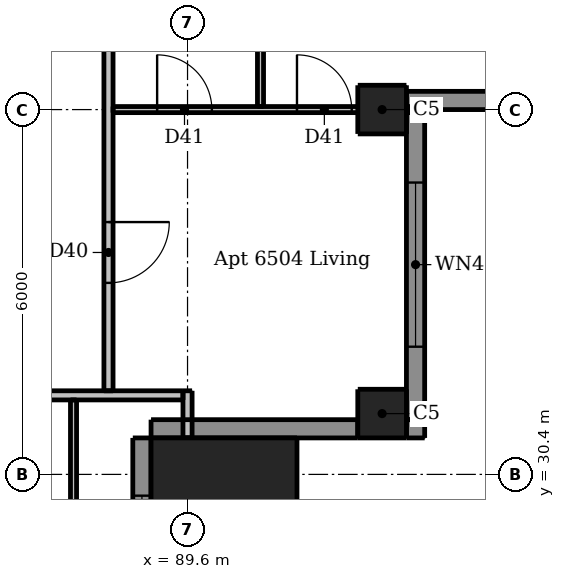
"""IFC4 building model, lengths in metres.
Left out: names, types, materials, properties, quantities, classifications, styles, units other than length and angle.
Written with IfcOpenShell. Run it as: python <this file> out.ifc"""

import sys

from ifc_helpers import new_model, si_unit, direction, frame, frame_2d, origin, origin_2d, place, context, subcontext, project, spatial, rectangle, extrude, element, fill, save


model = new_model("IFC4")
c1 = context("Model", 3, precision=1e-05, world=origin(), true_north=direction((0.0, 1.0)))
c2 = subcontext(c1, "Body", "Model", "MODEL_VIEW")
j1 = project(units=[si_unit("LENGTHUNIT", "METRE"), si_unit("PLANEANGLEUNIT", "RADIAN")], contexts=[c1])
p1 = place(None, origin())
s1 = spatial("IfcSite", under=j1, at=p1, CompositionType="ELEMENT")
p2 = place(p1, origin())
s2 = spatial("IfcBuilding", under=s1, at=p2, CompositionType="ELEMENT")
p3 = place(p2, frame((0.0, 0.0, 245.5)))
s3 = spatial("IfcBuildingStorey", under=s2, at=p3, CompositionType="ELEMENT", Elevation=245.5)
for number, where, z_axis, x_axis in (
    (1, (92.8, 31.4, 0.0), (0.0, 0.0, 1.0), (1.0, 0.0, 0.0)),
    (2, (92.8, 36.4, 0.0), (0.0, 0.0, 1.0), (1.0, 0.0, 0.0)),
):
    element("IfcColumn", number, at=place(p3, frame(where, z_axis=z_axis, x_axis=x_axis)), inside=s3, PredefinedType="COLUMN", context=c2, shape_type="SweptSolid", body=[
        extrude(rectangle(XDim=0.8, YDim=0.8, at=origin_2d()), origin(), (0.0, 0.0, 1.0), 3.05),
    ])
p4 = place(p3, frame((90.2, 29.8, 0.0), z_axis=(0.0, 0.0, 1.0), x_axis=(1.0, 0.0, 0.0)))
e3 = element("IfcColumn", 3, at=p4, inside=s3, PredefinedType="COLUMN", context=c2, shape_type="SweptSolid", body=[
    extrude(rectangle(XDim=2.4, YDim=2.4, at=origin_2d()), origin(), (0.0, 0.0, 1.0), 3.3),
])
p5 = place(p3, frame((88.85, 27.6, 0.0), z_axis=(0.0, 0.0, 1.0), x_axis=(0.0, 1.0, 0.0)))
e4 = element("IfcWall", 4, at=p5, inside=s3, PredefinedType="SOLIDWALL", context=c2, shape_type="SweptSolid", body=[
    extrude(rectangle(XDim=3.4, YDim=0.3, at=frame_2d((1.7, 0.0))), origin(), (0.0, 0.0, 1.0), 3.05),
])
p6 = place(p5, frame((0.95, 0.0, 0.9)))
e5 = element("IfcOpeningElement", 5, at=p6, cuts=e4, PredefinedType="OPENING", context=c2, shape_type="SweptSolid", body=[
    extrude(rectangle(XDim=1.5, YDim=1.5, at=frame_2d((0.75, 0.75))), frame((0.0, 0.16, 0.0), z_axis=(0.0, -1.0, 0.0), x_axis=(1.0, 0.0, 0.0)), (0.0, 0.0, 1.0), 0.32),
])
p7 = place(p3, frame((89.0, 31.15, 0.0), z_axis=(0.0, 0.0, 1.0), x_axis=(1.0, 0.0, 0.0)))
e6 = element("IfcWall", 6, at=p7, inside=s3, PredefinedType="SOLIDWALL", context=c2, shape_type="SweptSolid", body=[
    extrude(rectangle(XDim=3.4, YDim=0.3, at=frame_2d((1.7, 0.0))), origin(), (0.0, 0.0, 1.0), 3.05),
])
p8 = place(p3, frame((93.2, 31.15, 0.0), z_axis=(0.0, 0.0, 1.0), x_axis=(1.0, 0.0, 0.0)))
e7 = element("IfcWall", 7, at=p8, inside=s3, PredefinedType="SOLIDWALL", context=c2, shape_type="SweptSolid", body=[
    extrude(rectangle(XDim=0.3, YDim=0.3, at=frame_2d((0.15, 0.0))), origin(), (0.0, 0.0, 1.0), 3.05),
])
p9 = place(p3, frame((93.2, 36.55, 0.0), z_axis=(0.0, 0.0, 1.0), x_axis=(1.0, 0.0, 0.0)))
e8 = element("IfcWall", 8, at=p9, inside=s3, PredefinedType="SOLIDWALL", context=c2, shape_type="SweptSolid", body=[
    extrude(rectangle(XDim=1.8, YDim=0.3, at=frame_2d((0.9, 0.0))), origin(), (0.0, 0.0, 1.0), 3.05),
])
p10 = place(p3, frame((93.35, 31.3, 0.0), z_axis=(0.0, 0.0, 1.0), x_axis=(0.0, 1.0, 0.0)))
e9 = element("IfcWall", 9, at=p10, inside=s3, PredefinedType="SOLIDWALL", context=c2, shape_type="SweptSolid", body=[
    extrude(rectangle(XDim=5.1, YDim=0.3, at=frame_2d((2.55, 0.0))), origin(), (0.0, 0.0, 1.0), 3.05),
])
p11 = place(p10, frame((1.2, 0.0, 0.15)))
e10 = element("IfcOpeningElement", 10, at=p11, cuts=e9, PredefinedType="OPENING", context=c2, shape_type="SweptSolid", body=[
    extrude(rectangle(XDim=2.7, YDim=2.1, at=frame_2d((1.35, 1.05))), frame((0.0, 0.16, 0.0), z_axis=(0.0, -1.0, 0.0), x_axis=(1.0, 0.0, 0.0)), (0.0, 0.0, 1.0), 0.32),
])
p12 = place(p3, frame((87.725, 29.05, 0.0), z_axis=(0.0, 0.0, 1.0), x_axis=(0.0, 1.0, 0.0)))
e11 = element("IfcWall", 11, at=p12, inside=s3, PredefinedType="PARTITIONING", context=c2, shape_type="SweptSolid", body=[
    extrude(rectangle(XDim=2.575, YDim=0.1, at=frame_2d((1.288, 0.0))), origin(), (0.0, 0.0, 1.0), 3.05),
])
p13 = place(p3, frame((90.8, 36.45, 0.0), z_axis=(0.0, 0.0, 1.0), x_axis=(0.0, 1.0, 0.0)))
e12 = element("IfcWall", 12, at=p13, inside=s3, PredefinedType="PARTITIONING", context=c2, shape_type="SweptSolid", body=[
    extrude(rectangle(XDim=5.875, YDim=0.1, at=frame_2d((2.938, 0.0))), origin(), (0.0, 0.0, 1.0), 3.05),
])
p14 = place(p13, frame((3.75, 0.0, 0.0)))
e13 = element("IfcOpeningElement", 13, at=p14, cuts=e12, PredefinedType="OPENING", context=c2, shape_type="SweptSolid", body=[
    extrude(rectangle(XDim=0.8, YDim=2.1, at=frame_2d((0.4, 1.05))), frame((0.0, 0.06, 0.0), z_axis=(0.0, -1.0, 0.0), x_axis=(1.0, 0.0, 0.0)), (0.0, 0.0, 1.0), 0.12),
])
p15 = place(p3, frame((88.375, 36.4, 0.0), z_axis=(0.0, 0.0, 1.0), x_axis=(1.0, 0.0, 0.0)))
e14 = element("IfcWall", 14, at=p15, inside=s3, PredefinedType="PARTITIONING", context=c2, shape_type="SweptSolid", body=[
    extrude(rectangle(XDim=5.125, YDim=0.1, at=frame_2d((2.562, 0.0))), origin(), (0.0, 0.0, 1.0), 2.647),
])
p16 = place(p15, frame((0.725, 0.0, 0.0)))
e15 = element("IfcOpeningElement", 15, at=p16, cuts=e14, PredefinedType="OPENING", context=c2, shape_type="SweptSolid", body=[
    extrude(rectangle(XDim=0.9, YDim=2.1, at=frame_2d((0.45, 1.05))), frame((0.0, 0.06, 0.0), z_axis=(0.0, -1.0, 0.0), x_axis=(1.0, 0.0, 0.0)), (0.0, 0.0, 1.0), 0.12),
])
p17 = place(p15, frame((3.025, 0.0, 0.0)))
e16 = element("IfcOpeningElement", 16, at=p17, cuts=e14, PredefinedType="OPENING", context=c2, shape_type="SweptSolid", body=[
    extrude(rectangle(XDim=0.9, YDim=2.1, at=frame_2d((0.45, 1.05))), frame((0.0, 0.06, 0.0), z_axis=(0.0, -1.0, 0.0), x_axis=(1.0, 0.0, 0.0)), (0.0, 0.0, 1.0), 0.12),
])
p18 = place(p3, frame((88.3, 61.175, 0.0), z_axis=(0.0, 0.0, 1.0), x_axis=(0.0, -1.0, 0.0)))
e17 = element("IfcWall", 17, at=p18, inside=s3, PredefinedType="PARTITIONING", context=c2, shape_type="SweptSolid", body=[
    extrude(rectangle(XDim=29.4, YDim=0.15, at=frame_2d((14.7, 0.0))), origin(), (0.0, 0.0, 1.0), 3.05),
])
p19 = place(p18, frame((26.625, 0.0, 0.0)))
e18 = element("IfcOpeningElement", 18, at=p19, cuts=e17, PredefinedType="OPENING", context=c2, shape_type="SweptSolid", body=[
    extrude(rectangle(XDim=1.0, YDim=2.1, at=frame_2d((0.5, 1.05))), frame((0.0, 0.085, 0.0), z_axis=(0.0, -1.0, 0.0), x_axis=(1.0, 0.0, 0.0)), (0.0, 0.0, 1.0), 0.17),
])
p20 = place(p18, frame((15.275, 0.0, 0.0)))
e19 = element("IfcOpeningElement", 19, at=p20, cuts=e17, PredefinedType="OPENING", context=c2, shape_type="SweptSolid", body=[
    extrude(rectangle(XDim=1.0, YDim=2.1, at=frame_2d((0.5, 1.05))), frame((0.0, 0.085, 0.0), z_axis=(0.0, -1.0, 0.0), x_axis=(1.0, 0.0, 0.0)), (0.0, 0.0, 1.0), 0.17),
])
p21 = place(p18, frame((9.275, 0.0, 0.0)))
e20 = element("IfcOpeningElement", 20, at=p21, cuts=e17, PredefinedType="OPENING", context=c2, shape_type="SweptSolid", body=[
    extrude(rectangle(XDim=1.0, YDim=2.1, at=frame_2d((0.5, 1.05))), frame((0.0, 0.085, 0.0), z_axis=(0.0, -1.0, 0.0), x_axis=(1.0, 0.0, 0.0)), (0.0, 0.0, 1.0), 0.17),
])
p22 = place(p18, frame((3.275, 0.0, 0.0)))
e21 = element("IfcOpeningElement", 21, at=p22, cuts=e17, PredefinedType="OPENING", context=c2, shape_type="SweptSolid", body=[
    extrude(rectangle(XDim=1.0, YDim=2.1, at=frame_2d((0.5, 1.05))), frame((0.0, 0.085, 0.0), z_axis=(0.0, -1.0, 0.0), x_axis=(1.0, 0.0, 0.0)), (0.0, 0.0, 1.0), 0.17),
])
p23 = place(p3, frame((89.6, 31.0, 0.0), z_axis=(0.0, 0.0, 1.0), x_axis=(0.0, 1.0, 0.0)))
e22 = element("IfcWall", 22, at=p23, inside=s3, PredefinedType="PARTITIONING", context=c2, shape_type="SweptSolid", body=[
    extrude(rectangle(XDim=0.775, YDim=0.15, at=frame_2d((0.387, 0.0))), origin(), (0.0, 0.0, 1.0), 3.05),
])
p24 = place(p3, frame((89.525, 31.7, 0.0), z_axis=(0.0, 0.0, 1.0), x_axis=(-1.0, 0.0, 0.0)))
e23 = element("IfcWall", 23, at=p24, inside=s3, PredefinedType="PARTITIONING", context=c2, shape_type="SweptSolid", body=[
    extrude(rectangle(XDim=30.55, YDim=0.15, at=frame_2d((15.275, 0.0))), origin(), (0.0, 0.0, 1.0), 3.05),
])
p25 = place(p24, frame((26.775, 0.0, 0.0)))
e24 = element("IfcOpeningElement", 24, at=p25, cuts=e23, PredefinedType="OPENING", context=c2, shape_type="SweptSolid", body=[
    extrude(rectangle(XDim=1.0, YDim=2.1, at=frame_2d((0.5, 1.05))), frame((0.0, 0.085, 0.0), z_axis=(0.0, -1.0, 0.0), x_axis=(1.0, 0.0, 0.0)), (0.0, 0.0, 1.0), 0.17),
])
p26 = place(p24, frame((14.425, 0.0, 0.0)))
e25 = element("IfcOpeningElement", 25, at=p26, cuts=e23, PredefinedType="OPENING", context=c2, shape_type="SweptSolid", body=[
    extrude(rectangle(XDim=1.0, YDim=2.1, at=frame_2d((0.5, 1.05))), frame((0.0, 0.085, 0.0), z_axis=(0.0, -1.0, 0.0), x_axis=(1.0, 0.0, 0.0)), (0.0, 0.0, 1.0), 0.17),
])
p27 = place(p24, frame((6.962, 0.0, 0.0)))
e26 = element("IfcOpeningElement", 26, at=p27, cuts=e23, PredefinedType="OPENING", context=c2, shape_type="SweptSolid", body=[
    extrude(rectangle(XDim=1.0, YDim=2.1, at=frame_2d((0.5, 1.05))), frame((0.0, 0.085, 0.0), z_axis=(0.0, -1.0, 0.0), x_axis=(1.0, 0.0, 0.0)), (0.0, 0.0, 1.0), 0.17),
])
p28 = place(p6, origin())
e27 = element("IfcWindow", 27, at=p28, inside=s3, PartitioningType="DOUBLE_PANEL_VERTICAL", PredefinedType="WINDOW", context=c2, shape_type="SweptSolid", body=[
    extrude(rectangle(XDim=1.5, YDim=1.5, at=frame_2d((0.75, 0.75))), frame((0.0, 0.03, 0.0), z_axis=(0.0, -1.0, 0.0), x_axis=(1.0, 0.0, 0.0)), (0.0, 0.0, 1.0), 0.06),
])
fill(e5, e27)
p29 = place(p11, origin())
e28 = element("IfcWindow", 28, at=p29, inside=s3, PartitioningType="DOUBLE_PANEL_VERTICAL", PredefinedType="WINDOW", context=c2, shape_type="SweptSolid", body=[
    extrude(rectangle(XDim=2.7, YDim=2.1, at=frame_2d((1.35, 1.05))), frame((0.0, 0.03, 0.0), z_axis=(0.0, -1.0, 0.0), x_axis=(1.0, 0.0, 0.0)), (0.0, 0.0, 1.0), 0.06),
])
fill(e10, e28)
p30 = place(p19, origin())
e29 = element("IfcDoor", 29, at=p30, inside=s3, OperationType="SINGLE_SWING_LEFT", PredefinedType="DOOR", context=c2, shape_type="SweptSolid", body=[
    extrude(rectangle(XDim=1.0, YDim=2.1, at=frame_2d((0.5, 1.05))), frame((0.0, 0.025, 0.0), z_axis=(0.0, -1.0, 0.0), x_axis=(1.0, 0.0, 0.0)), (0.0, 0.0, 1.0), 0.05),
])
fill(e18, e29)
p31 = place(p16, origin())
e30 = element("IfcDoor", 30, at=p31, inside=s3, OperationType="SINGLE_SWING_LEFT", PredefinedType="DOOR", context=c2, shape_type="SweptSolid", body=[
    extrude(rectangle(XDim=0.9, YDim=2.1, at=frame_2d((0.45, 1.05))), frame((0.0, 0.025, 0.0), z_axis=(0.0, -1.0, 0.0), x_axis=(1.0, 0.0, 0.0)), (0.0, 0.0, 1.0), 0.05),
])
fill(e15, e30)
p32 = place(p17, origin())
e31 = element("IfcDoor", 31, at=p32, inside=s3, OperationType="SINGLE_SWING_LEFT", PredefinedType="DOOR", context=c2, shape_type="SweptSolid", body=[
    extrude(rectangle(XDim=0.9, YDim=2.1, at=frame_2d((0.45, 1.05))), frame((0.0, 0.025, 0.0), z_axis=(0.0, -1.0, 0.0), x_axis=(1.0, 0.0, 0.0)), (0.0, 0.0, 1.0), 0.05),
])
fill(e16, e31)
save(model, sys.argv[1])
